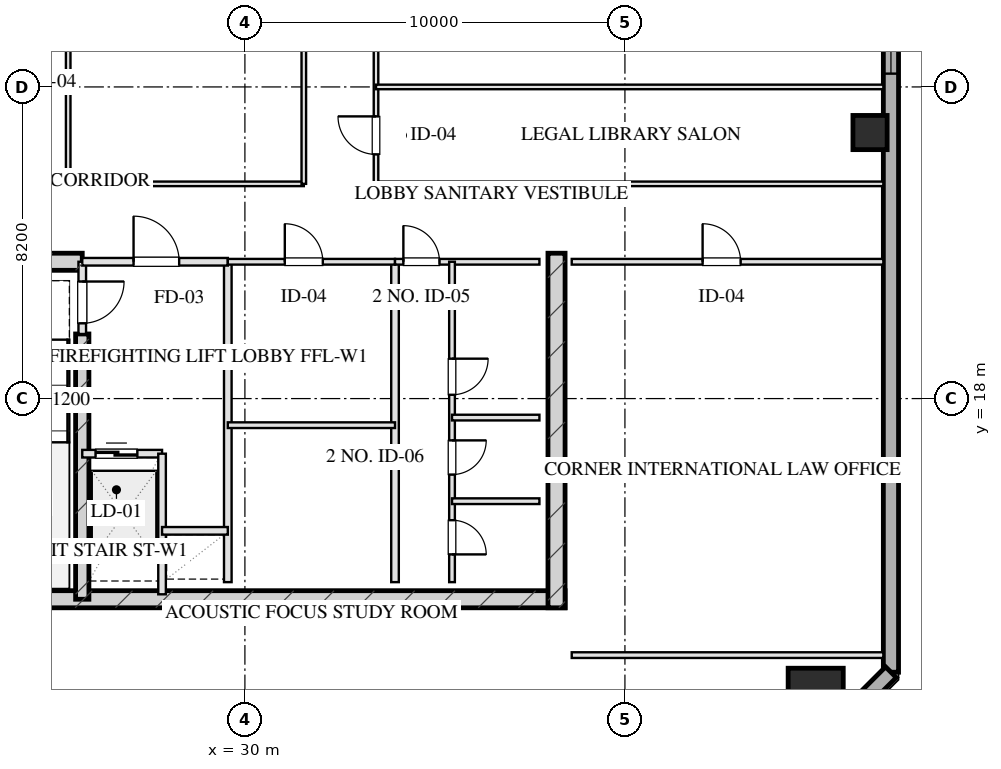
"""IFC4 building model, lengths in metres.
Left out: names, types, materials, properties, quantities, classifications, styles, units other than length and angle.
Written with IfcOpenShell. Run it as: python <this file> out.ifc"""

import sys

from ifc_helpers import new_model, si_unit, direction, frame, frame_2d, origin, origin_2d, place, context, subcontext, project, spatial, rectangle, hollow_rectangle, extrude, element, fill, save


model = new_model("IFC4")
c1 = context("Model", 3, precision=1e-05, world=origin(), true_north=direction((0.0, 1.0)))
c2 = subcontext(c1, "Body", "Model", "MODEL_VIEW")
j1 = project(units=[si_unit("LENGTHUNIT", "METRE"), si_unit("PLANEANGLEUNIT", "RADIAN")], contexts=[c1])
p1 = place(None, origin())
s1 = spatial("IfcSite", under=j1, at=p1, CompositionType="ELEMENT")
p2 = place(p1, origin())
s2 = spatial("IfcBuilding", under=s1, at=p2, CompositionType="ELEMENT")
p3 = place(p2, frame((0.0, 0.0, 192.05)))
s3 = spatial("IfcBuildingStorey", under=s2, at=p3, CompositionType="ELEMENT", Elevation=192.05)
p4 = place(p3, frame((21.575, 12.72, 0.0), z_axis=(0.0, 0.0, 1.0), x_axis=(1.0, 0.0, 0.0)))
e1 = element("IfcWall", 1, at=p4, inside=s3, PredefinedType="SHEAR", context=c2, shape_type="SweptSolid", body=[
    extrude(rectangle(XDim=16.85, YDim=0.45, at=frame_2d((8.425, 0.0))), origin(), (0.0, 0.0, 1.0), 3.45),
])
p5 = place(p3, frame((38.2, 21.825, 0.0), z_axis=(0.0, 0.0, 1.0), x_axis=(0.0, -1.0, 0.0)))
e2 = element("IfcWall", 2, at=p5, inside=s3, PredefinedType="SHEAR", context=c2, shape_type="SweptSolid", body=[
    extrude(rectangle(XDim=9.33, YDim=0.45, at=frame_2d((4.665, 0.0))), origin(), (0.0, 0.0, 1.0), 3.45),
])
p6 = place(p3, frame((25.72, 19.7, 0.0), z_axis=(0.0, 0.0, 1.0), x_axis=(0.0, -1.0, 0.0)))
e3 = element("IfcWall", 3, at=p6, inside=s3, PredefinedType="SHEAR", context=c2, shape_type="SweptSolid", body=[
    extrude(rectangle(XDim=6.98, YDim=0.35, at=frame_2d((3.49, 0.0))), origin(), (0.0, 0.0, 1.0), 3.45),
])
p7 = place(p3, frame((21.575, 21.6, 0.0), z_axis=(0.0, 0.0, 1.0), x_axis=(1.0, 0.0, 0.0)))
e4 = element("IfcWall", 4, at=p7, inside=s3, PredefinedType="SHEAR", context=c2, shape_type="SweptSolid", body=[
    extrude(rectangle(XDim=4.145, YDim=0.45, at=frame_2d((2.073, 0.0))), origin(), (0.0, 0.0, 1.0), 3.45),
])
p8 = place(p3, frame((45.02, 10.18, 0.0), z_axis=(0.0, 0.0, 1.0), x_axis=(1.0, 0.0, 0.0)))
e5 = element("IfcColumn", 5, at=p8, inside=s3, PredefinedType="COLUMN", context=c2, shape_type="SweptSolid", body=[
    extrude(hollow_rectangle(XDim=1.45, YDim=1.45, WallThickness=0.05, at=origin_2d()), origin(), (0.0, 0.0, 1.0), 3.451),
])
p9 = place(p3, frame((46.45, 25.0, 0.0), z_axis=(0.0, 0.0, 1.0), x_axis=(1.0, 0.0, 0.0)))
e6 = element("IfcColumn", 6, at=p9, inside=s3, PredefinedType="COLUMN", context=c2, shape_type="SweptSolid", body=[
    extrude(hollow_rectangle(XDim=0.9, YDim=0.9, WallThickness=0.032, at=origin_2d()), origin(), (0.0, 0.0, 1.0), 3.451),
])
p10 = place(p3, frame((47.0, 57.2, 0.0), z_axis=(0.0, 0.0, 1.0), x_axis=(0.0, -1.0, 0.0)))
e7 = element("IfcWall", 7, at=p10, inside=s3, PredefinedType="SOLIDWALL", context=c2, shape_type="SweptSolid", body=[
    extrude(rectangle(XDim=46.4, YDim=0.4, at=frame_2d((23.2, 0.0))), origin(), (0.0, 0.0, 1.0), 2.61),
])
p11 = place(p10, frame((28.55, 0.0, 0.75)))
e8 = element("IfcOpeningElement", 8, at=p11, cuts=e7, PredefinedType="OPENING", context=c2, shape_type="SweptSolid", body=[
    extrude(rectangle(XDim=2.1, YDim=1.46, at=frame_2d((1.05, 0.73))), frame((0.0, 0.21, 0.0), z_axis=(0.0, -1.0, 0.0), x_axis=(1.0, 0.0, 0.0)), (0.0, 0.0, 1.0), 0.42),
])
p12 = place(p10, frame((24.75, 0.0, 0.75)))
e9 = element("IfcOpeningElement", 9, at=p12, cuts=e7, PredefinedType="OPENING", context=c2, shape_type="SweptSolid", body=[
    extrude(rectangle(XDim=2.1, YDim=1.46, at=frame_2d((1.05, 0.73))), frame((0.0, 0.21, 0.0), z_axis=(0.0, -1.0, 0.0), x_axis=(1.0, 0.0, 0.0)), (0.0, 0.0, 1.0), 0.42),
])
p13 = place(p10, frame((19.55, 0.0, 0.75)))
e10 = element("IfcOpeningElement", 10, at=p13, cuts=e7, PredefinedType="OPENING", context=c2, shape_type="SweptSolid", body=[
    extrude(rectangle(XDim=2.1, YDim=1.46, at=frame_2d((1.05, 0.73))), frame((0.0, 0.21, 0.0), z_axis=(0.0, -1.0, 0.0), x_axis=(1.0, 0.0, 0.0)), (0.0, 0.0, 1.0), 0.42),
])
p14 = place(p10, frame((15.75, 0.0, 0.75)))
e11 = element("IfcOpeningElement", 11, at=p14, cuts=e7, PredefinedType="OPENING", context=c2, shape_type="SweptSolid", body=[
    extrude(rectangle(XDim=2.1, YDim=1.46, at=frame_2d((1.05, 0.73))), frame((0.0, 0.21, 0.0), z_axis=(0.0, -1.0, 0.0), x_axis=(1.0, 0.0, 0.0)), (0.0, 0.0, 1.0), 0.42),
])
p15 = place(p3, frame((47.0, 10.8, 0.0), z_axis=(0.0, 0.0, 1.0), x_axis=(-0.707106781187, -0.707106781187, 0.0)))
e12 = element("IfcWall", 12, at=p15, inside=s3, PredefinedType="SOLIDWALL", context=c2, shape_type="SweptSolid", body=[
    extrude(rectangle(XDim=3.677, YDim=0.4, at=frame_2d((1.838, 0.0))), origin(), (0.0, 0.0, 1.0), 2.61),
])
p16 = place(p3, frame((25.72, 21.6, 0.0), z_axis=(0.0, 0.0, 1.0), x_axis=(0.0, -1.0, 0.0)))
e13 = element("IfcWall", 13, at=p16, inside=s3, PredefinedType="PARTITIONING", context=c2, shape_type="SweptSolid", body=[
    extrude(rectangle(XDim=1.9, YDim=0.2, at=frame_2d((0.95, 0.0))), origin(), (0.0, 0.0, 1.0), 3.175),
])
p17 = place(p16, frame((0.52, 0.0, 0.0)))
e14 = element("IfcOpeningElement", 14, at=p17, cuts=e13, PredefinedType="OPENING", context=c2, shape_type="SweptSolid", body=[
    extrude(rectangle(XDim=1.1, YDim=2.05, at=frame_2d((0.55, 1.025))), frame((0.0, 0.11, 0.0), z_axis=(0.0, -1.0, 0.0), x_axis=(1.0, 0.0, 0.0)), (0.0, 0.0, 1.0), 0.22),
])
p18 = place(p3, frame((29.55, 21.6, 0.0), z_axis=(0.0, 0.0, 1.0), x_axis=(0.0, -1.0, 0.0)))
e15 = element("IfcWall", 15, at=p18, inside=s3, PredefinedType="PARTITIONING", context=c2, shape_type="SweptSolid", body=[
    extrude(rectangle(XDim=8.43, YDim=0.2, at=frame_2d((4.215, 0.0))), origin(), (0.0, 0.0, 1.0), 3.175),
])
p19 = place(p3, frame((25.72, 21.6, 0.0), z_axis=(0.0, 0.0, 1.0), x_axis=(1.0, 0.0, 0.0)))
e16 = element("IfcWall", 16, at=p19, inside=s3, PredefinedType="PARTITIONING", context=c2, shape_type="SweptSolid", body=[
    extrude(rectangle(XDim=3.83, YDim=0.2, at=frame_2d((1.915, 0.0))), origin(), (0.0, 0.0, 1.0), 3.175),
])
p20 = place(p19, frame((1.35, 0.0, 0.0)))
e17 = element("IfcOpeningElement", 17, at=p20, cuts=e16, PredefinedType="OPENING", context=c2, shape_type="SweptSolid", body=[
    extrude(rectangle(XDim=1.2, YDim=2.05, at=frame_2d((0.6, 1.025))), frame((0.0, 0.11, 0.0), z_axis=(0.0, -1.0, 0.0), x_axis=(1.0, 0.0, 0.0)), (0.0, 0.0, 1.0), 0.22),
])
p21 = place(p3, frame((25.72, 16.55, 0.0), z_axis=(0.0, 0.0, 1.0), x_axis=(1.0, 0.0, 0.0)))
e18 = element("IfcWall", 18, at=p21, inside=s3, PredefinedType="PARTITIONING", context=c2, shape_type="SweptSolid", body=[
    extrude(rectangle(XDim=2.1, YDim=0.2, at=frame_2d((1.05, 0.0))), origin(), (0.0, 0.0, 1.0), 3.175),
])
p22 = place(p21, frame((0.35, 0.0, 0.0)))
e19 = element("IfcOpeningElement", 19, at=p22, cuts=e18, PredefinedType="OPENING", context=c2, shape_type="SweptSolid", body=[
    extrude(rectangle(XDim=1.1, YDim=2.05, at=frame_2d((0.55, 1.025))), frame((0.0, 0.11, 0.0), z_axis=(0.0, -1.0, 0.0), x_axis=(1.0, 0.0, 0.0)), (0.0, 0.0, 1.0), 0.22),
])
p23 = place(p3, frame((27.82, 16.55, 0.0), z_axis=(0.0, 0.0, 1.0), x_axis=(0.0, -1.0, 0.0)))
e20 = element("IfcWall", 20, at=p23, inside=s3, PredefinedType="PARTITIONING", context=c2, shape_type="SweptSolid", body=[
    extrude(rectangle(XDim=3.7, YDim=0.2, at=frame_2d((1.85, 0.0))), origin(), (0.0, 0.0, 1.0), 3.175),
])
p24 = place(p3, frame((27.82, 14.52, 0.0), z_axis=(0.0, 0.0, 1.0), x_axis=(1.0, 0.0, 0.0)))
e21 = element("IfcWall", 21, at=p24, inside=s3, PredefinedType="PARTITIONING", context=c2, shape_type="SweptSolid", body=[
    extrude(rectangle(XDim=1.73, YDim=0.2, at=frame_2d((0.865, 0.0))), origin(), (0.0, 0.0, 1.0), 3.175),
])
p25 = place(p3, frame((33.95, 21.6, 0.0), z_axis=(0.0, 0.0, 1.0), x_axis=(0.0, -1.0, 0.0)))
e22 = element("IfcWall", 22, at=p25, inside=s3, PredefinedType="PARTITIONING", context=c2, shape_type="SweptSolid", body=[
    extrude(rectangle(XDim=8.43, YDim=0.2, at=frame_2d((4.215, 0.0))), origin(), (0.0, 0.0, 1.0), 3.175),
])
p26 = place(p3, frame((29.55, 21.6, 0.0), z_axis=(0.0, 0.0, 1.0), x_axis=(1.0, 0.0, 0.0)))
e23 = element("IfcWall", 23, at=p26, inside=s3, PredefinedType="PARTITIONING", context=c2, shape_type="SweptSolid", body=[
    extrude(rectangle(XDim=4.4, YDim=0.15, at=frame_2d((2.2, 0.0))), origin(), (0.0, 0.0, 1.0), 3.175),
])
p27 = place(p26, frame((1.5, 0.0, 0.0)))
e24 = element("IfcOpeningElement", 24, at=p27, cuts=e23, PredefinedType="OPENING", context=c2, shape_type="SweptSolid", body=[
    extrude(rectangle(XDim=1.0, YDim=2.05, at=frame_2d((0.5, 1.025))), frame((0.0, 0.085, 0.0), z_axis=(0.0, -1.0, 0.0), x_axis=(1.0, 0.0, 0.0)), (0.0, 0.0, 1.0), 0.17),
])
p28 = place(p3, frame((29.55, 17.3, 0.0), z_axis=(0.0, 0.0, 1.0), x_axis=(1.0, 0.0, 0.0)))
e25 = element("IfcWall", 25, at=p28, inside=s3, PredefinedType="PARTITIONING", context=c2, shape_type="SweptSolid", body=[
    extrude(rectangle(XDim=4.4, YDim=0.15, at=frame_2d((2.2, 0.0))), origin(), (0.0, 0.0, 1.0), 3.175),
])
p29 = place(p3, frame((33.95, 21.6, 0.0), z_axis=(0.0, 0.0, 1.0), x_axis=(1.0, 0.0, 0.0)))
e26 = element("IfcWall", 26, at=p29, inside=s3, PredefinedType="PARTITIONING", context=c2, shape_type="SweptSolid", body=[
    extrude(rectangle(XDim=3.8, YDim=0.15, at=frame_2d((1.9, 0.0))), origin(), (0.0, 0.0, 1.0), 3.175),
])
p30 = place(p29, frame((0.22, 0.0, 0.0)))
e27 = element("IfcOpeningElement", 27, at=p30, cuts=e26, PredefinedType="OPENING", context=c2, shape_type="SweptSolid", body=[
    extrude(rectangle(XDim=0.95, YDim=2.05, at=frame_2d((0.475, 1.025))), frame((0.0, 0.085, 0.0), z_axis=(0.0, -1.0, 0.0), x_axis=(1.0, 0.0, 0.0)), (0.0, 0.0, 1.0), 0.17),
])
p31 = place(p3, frame((35.45, 21.6, 0.0), z_axis=(0.0, 0.0, 1.0), x_axis=(0.0, -1.0, 0.0)))
e28 = element("IfcWall", 28, at=p31, inside=s3, PredefinedType="PARTITIONING", context=c2, shape_type="SweptSolid", body=[
    extrude(rectangle(XDim=8.43, YDim=0.15, at=frame_2d((4.215, 0.0))), origin(), (0.0, 0.0, 1.0), 2.815),
])
p32 = place(p31, frame((2.55, 0.0, 0.0)))
e29 = element("IfcOpeningElement", 29, at=p32, cuts=e28, PredefinedType="OPENING", context=c2, shape_type="SweptSolid", body=[
    extrude(rectangle(XDim=0.95, YDim=2.05, at=frame_2d((0.475, 1.025))), frame((0.0, 0.085, 0.0), z_axis=(0.0, -1.0, 0.0), x_axis=(1.0, 0.0, 0.0)), (0.0, 0.0, 1.0), 0.17),
])
p33 = place(p31, frame((4.7, 0.0, 0.0)))
e30 = element("IfcOpeningElement", 30, at=p33, cuts=e28, PredefinedType="OPENING", context=c2, shape_type="SweptSolid", body=[
    extrude(rectangle(XDim=0.9, YDim=2.05, at=frame_2d((0.45, 1.025))), frame((0.0, 0.085, 0.0), z_axis=(0.0, -1.0, 0.0), x_axis=(1.0, 0.0, 0.0)), (0.0, 0.0, 1.0), 0.17),
])
p34 = place(p31, frame((6.8, 0.0, 0.0)))
e31 = element("IfcOpeningElement", 31, at=p34, cuts=e28, PredefinedType="OPENING", context=c2, shape_type="SweptSolid", body=[
    extrude(rectangle(XDim=0.9, YDim=2.05, at=frame_2d((0.45, 1.025))), frame((0.0, 0.085, 0.0), z_axis=(0.0, -1.0, 0.0), x_axis=(1.0, 0.0, 0.0)), (0.0, 0.0, 1.0), 0.17),
])
for number, where, z_axis, x_axis in (
    (32, (35.45, 17.5, 0.0), (0.0, 0.0, 1.0), (1.0, 0.0, 0.0)),
    (33, (35.45, 15.3, 0.0), (0.0, 0.0, 1.0), (1.0, 0.0, 0.0)),
):
    element("IfcWall", number, at=place(p3, frame(where, z_axis=z_axis, x_axis=x_axis)), inside=s3, PredefinedType="PARTITIONING", context=c2, shape_type="SweptSolid", body=[
        extrude(rectangle(XDim=2.3, YDim=0.15, at=frame_2d((1.15, 0.0))), origin(), (0.0, 0.0, 1.0), 3.175),
    ])
p35 = place(p3, frame((38.6, 11.25, 0.0), z_axis=(0.0, 0.0, 1.0), x_axis=(1.0, 0.0, 0.0)))
e34 = element("IfcWall", 34, at=p35, inside=s3, PredefinedType="PARTITIONING", context=c2, shape_type="SweptSolid", body=[
    extrude(rectangle(XDim=8.2, YDim=0.15, at=frame_2d((4.1, 0.0))), origin(), (0.0, 0.0, 1.0), 3.175),
])
p36 = place(p3, frame((38.6, 21.6, 0.0), z_axis=(0.0, 0.0, 1.0), x_axis=(1.0, 0.0, 0.0)))
e35 = element("IfcWall", 35, at=p36, inside=s3, PredefinedType="PARTITIONING", context=c2, shape_type="SweptSolid", body=[
    extrude(rectangle(XDim=8.2, YDim=0.15, at=frame_2d((4.1, 0.0))), origin(), (0.0, 0.0, 1.0), 3.175),
])
p37 = place(p36, frame((3.444, 0.0, 0.0)))
e36 = element("IfcOpeningElement", 36, at=p37, cuts=e35, PredefinedType="OPENING", context=c2, shape_type="SweptSolid", body=[
    extrude(rectangle(XDim=1.0, YDim=2.05, at=frame_2d((0.5, 1.025))), frame((0.0, 0.085, 0.0), z_axis=(0.0, -1.0, 0.0), x_axis=(1.0, 0.0, 0.0)), (0.0, 0.0, 1.0), 0.17),
])
p38 = place(p3, frame((25.35, 23.65, 0.0), z_axis=(0.0, 0.0, 1.0), x_axis=(1.0, 0.0, 0.0)))
e37 = element("IfcWall", 37, at=p38, inside=s3, PredefinedType="PARTITIONING", context=c2, shape_type="SweptSolid", body=[
    extrude(rectangle(XDim=6.2, YDim=0.12, at=frame_2d((3.1, 0.0))), origin(), (0.0, 0.0, 1.0), 3.175),
])
p39 = place(p3, frame((33.45, 23.65, 0.0), z_axis=(0.0, 0.0, 1.0), x_axis=(1.0, 0.0, 0.0)))
e38 = element("IfcWall", 38, at=p39, inside=s3, PredefinedType="PARTITIONING", context=c2, shape_type="SweptSolid", body=[
    extrude(rectangle(XDim=13.35, YDim=0.12, at=frame_2d((6.675, 0.0))), origin(), (0.0, 0.0, 1.0), 3.175),
])
p40 = place(p3, frame((25.35, 23.65, 0.0), z_axis=(0.0, 0.0, 1.0), x_axis=(0.0, 1.0, 0.0)))
e39 = element("IfcWall", 39, at=p40, inside=s3, PredefinedType="PARTITIONING", context=c2, shape_type="SweptSolid", body=[
    extrude(rectangle(XDim=20.7, YDim=0.12, at=frame_2d((10.35, 0.0))), origin(), (0.0, 0.0, 1.0), 3.175),
])
p41 = place(p40, frame((4.963, 0.0, 0.0)))
e40 = element("IfcOpeningElement", 40, at=p41, cuts=e39, PredefinedType="OPENING", context=c2, shape_type="SweptSolid", body=[
    extrude(rectangle(XDim=1.1, YDim=2.05, at=frame_2d((0.55, 1.025))), frame((0.0, 0.07, 0.0), z_axis=(0.0, -1.0, 0.0), x_axis=(1.0, 0.0, 0.0)), (0.0, 0.0, 1.0), 0.14),
])
p42 = place(p40, frame((15.382, 0.0, 0.0)))
e41 = element("IfcOpeningElement", 41, at=p42, cuts=e39, PredefinedType="OPENING", context=c2, shape_type="SweptSolid", body=[
    extrude(rectangle(XDim=1.1, YDim=2.05, at=frame_2d((0.55, 1.025))), frame((0.0, 0.07, 0.0), z_axis=(0.0, -1.0, 0.0), x_axis=(1.0, 0.0, 0.0)), (0.0, 0.0, 1.0), 0.14),
])
p43 = place(p3, frame((31.55, 23.65, 0.0), z_axis=(0.0, 0.0, 1.0), x_axis=(0.0, 1.0, 0.0)))
e42 = element("IfcWall", 42, at=p43, inside=s3, PredefinedType="PARTITIONING", context=c2, shape_type="SweptSolid", body=[
    extrude(rectangle(XDim=20.7, YDim=0.12, at=frame_2d((10.35, 0.0))), origin(), (0.0, 0.0, 1.0), 3.175),
])
p44 = place(p3, frame((33.45, 23.65, 0.0), z_axis=(0.0, 0.0, 1.0), x_axis=(0.0, 1.0, 0.0)))
e43 = element("IfcWall", 43, at=p44, inside=s3, PredefinedType="PARTITIONING", context=c2, shape_type="SweptSolid", body=[
    extrude(rectangle(XDim=20.7, YDim=0.12, at=frame_2d((10.35, 0.0))), origin(), (0.0, 0.0, 1.0), 3.175),
])
p45 = place(p44, frame((0.775, 0.0, 0.0)))
e44 = element("IfcOpeningElement", 44, at=p45, cuts=e43, PredefinedType="OPENING", context=c2, shape_type="SweptSolid", body=[
    extrude(rectangle(XDim=1.0, YDim=2.05, at=frame_2d((0.5, 1.025))), frame((0.0, 0.07, 0.0), z_axis=(0.0, -1.0, 0.0), x_axis=(1.0, 0.0, 0.0)), (0.0, 0.0, 1.0), 0.14),
])
p46 = place(p44, frame((5.35, 0.0, 0.0)))
e45 = element("IfcOpeningElement", 45, at=p46, cuts=e43, PredefinedType="OPENING", context=c2, shape_type="SweptSolid", body=[
    extrude(rectangle(XDim=1.0, YDim=2.05, at=frame_2d((0.5, 1.025))), frame((0.0, 0.07, 0.0), z_axis=(0.0, -1.0, 0.0), x_axis=(1.0, 0.0, 0.0)), (0.0, 0.0, 1.0), 0.14),
])
p47 = place(p44, frame((9.85, 0.0, 0.0)))
e46 = element("IfcOpeningElement", 46, at=p47, cuts=e43, PredefinedType="OPENING", context=c2, shape_type="SweptSolid", body=[
    extrude(rectangle(XDim=1.0, YDim=2.05, at=frame_2d((0.5, 1.025))), frame((0.0, 0.07, 0.0), z_axis=(0.0, -1.0, 0.0), x_axis=(1.0, 0.0, 0.0)), (0.0, 0.0, 1.0), 0.14),
])
p48 = place(p44, frame((12.95, 0.0, 0.0)))
e47 = element("IfcOpeningElement", 47, at=p48, cuts=e43, PredefinedType="OPENING", context=c2, shape_type="SweptSolid", body=[
    extrude(rectangle(XDim=1.0, YDim=2.05, at=frame_2d((0.5, 1.025))), frame((0.0, 0.07, 0.0), z_axis=(0.0, -1.0, 0.0), x_axis=(1.0, 0.0, 0.0)), (0.0, 0.0, 1.0), 0.14),
])
p49 = place(p44, frame((17.525, 0.0, 0.0)))
e48 = element("IfcOpeningElement", 48, at=p49, cuts=e43, PredefinedType="OPENING", context=c2, shape_type="SweptSolid", body=[
    extrude(rectangle(XDim=1.0, YDim=2.05, at=frame_2d((0.5, 1.025))), frame((0.0, 0.07, 0.0), z_axis=(0.0, -1.0, 0.0), x_axis=(1.0, 0.0, 0.0)), (0.0, 0.0, 1.0), 0.14),
])
p50 = place(p3, frame((33.45, 26.2, 0.0), z_axis=(0.0, 0.0, 1.0), x_axis=(1.0, 0.0, 0.0)))
e49 = element("IfcWall", 49, at=p50, inside=s3, PredefinedType="PARTITIONING", context=c2, shape_type="SweptSolid", body=[
    extrude(rectangle(XDim=13.35, YDim=0.12, at=frame_2d((6.675, 0.0))), origin(), (0.0, 0.0, 1.0), 3.175),
])
p51 = place(p11, origin())
e50 = element("IfcWindow", 50, at=p51, inside=s3, PartitioningType="TRIPLE_PANEL_VERTICAL", PredefinedType="WINDOW", context=c2, shape_type="SweptSolid", body=[
    extrude(rectangle(XDim=2.1, YDim=1.46, at=frame_2d((1.05, 0.73))), frame((0.0, 0.03, 0.0), z_axis=(0.0, -1.0, 0.0), x_axis=(1.0, 0.0, 0.0)), (0.0, 0.0, 1.0), 0.06),
])
fill(e8, e50)
p52 = place(p17, origin())
e51 = element("IfcDoor", 51, at=p52, inside=s3, OperationType="SINGLE_SWING_LEFT", PredefinedType="DOOR", context=c2, shape_type="SweptSolid", body=[
    extrude(rectangle(XDim=1.1, YDim=2.05, at=frame_2d((0.55, 1.025))), frame((0.0, 0.025, 0.0), z_axis=(0.0, -1.0, 0.0), x_axis=(1.0, 0.0, 0.0)), (0.0, 0.0, 1.0), 0.05),
])
fill(e14, e51)
p53 = place(p20, origin())
e52 = element("IfcDoor", 52, at=p53, inside=s3, OperationType="SINGLE_SWING_LEFT", PredefinedType="DOOR", context=c2, shape_type="SweptSolid", body=[
    extrude(rectangle(XDim=1.2, YDim=2.05, at=frame_2d((0.6, 1.025))), frame((0.0, 0.025, 0.0), z_axis=(0.0, -1.0, 0.0), x_axis=(1.0, 0.0, 0.0)), (0.0, 0.0, 1.0), 0.05),
])
fill(e17, e52)
p54 = place(p22, origin())
e53 = element("IfcDoor", 53, at=p54, inside=s3, OperationType="DOUBLE_DOOR_SLIDING", PredefinedType="DOOR", context=c2, shape_type="SweptSolid", body=[
    extrude(rectangle(XDim=1.1, YDim=2.05, at=frame_2d((0.55, 1.025))), frame((0.0, 0.025, 0.0), z_axis=(0.0, -1.0, 0.0), x_axis=(1.0, 0.0, 0.0)), (0.0, 0.0, 1.0), 0.05),
])
fill(e19, e53)
p55 = place(p27, origin())
e54 = element("IfcDoor", 54, at=p55, inside=s3, OperationType="SINGLE_SWING_LEFT", PredefinedType="DOOR", context=c2, shape_type="SweptSolid", body=[
    extrude(rectangle(XDim=1.0, YDim=2.05, at=frame_2d((0.5, 1.025))), frame((0.0, 0.025, 0.0), z_axis=(0.0, -1.0, 0.0), x_axis=(1.0, 0.0, 0.0)), (0.0, 0.0, 1.0), 0.05),
])
fill(e24, e54)
p56 = place(p30, origin())
e55 = element("IfcDoor", 55, at=p56, inside=s3, OperationType="SINGLE_SWING_LEFT", PredefinedType="DOOR", context=c2, shape_type="SweptSolid", body=[
    extrude(rectangle(XDim=0.95, YDim=2.05, at=frame_2d((0.475, 1.025))), frame((0.0, 0.025, 0.0), z_axis=(0.0, -1.0, 0.0), x_axis=(1.0, 0.0, 0.0)), (0.0, 0.0, 1.0), 0.05),
])
fill(e27, e55)
p57 = place(p32, origin())
e56 = element("IfcDoor", 56, at=p57, inside=s3, OperationType="SINGLE_SWING_LEFT", PredefinedType="DOOR", context=c2, shape_type="SweptSolid", body=[
    extrude(rectangle(XDim=0.95, YDim=2.05, at=frame_2d((0.475, 1.025))), frame((0.0, 0.025, 0.0), z_axis=(0.0, -1.0, 0.0), x_axis=(1.0, 0.0, 0.0)), (0.0, 0.0, 1.0), 0.05),
])
fill(e29, e56)
p58 = place(p33, origin())
e57 = element("IfcDoor", 57, at=p58, inside=s3, OperationType="SINGLE_SWING_LEFT", PredefinedType="DOOR", context=c2, shape_type="SweptSolid", body=[
    extrude(rectangle(XDim=0.9, YDim=2.05, at=frame_2d((0.45, 1.025))), frame((0.0, 0.025, 0.0), z_axis=(0.0, -1.0, 0.0), x_axis=(1.0, 0.0, 0.0)), (0.0, 0.0, 1.0), 0.05),
])
fill(e30, e57)
p59 = place(p34, origin())
e58 = element("IfcDoor", 58, at=p59, inside=s3, OperationType="SINGLE_SWING_RIGHT", PredefinedType="DOOR", context=c2, shape_type="SweptSolid", body=[
    extrude(rectangle(XDim=0.9, YDim=2.05, at=frame_2d((0.45, 1.025))), frame((0.0, 0.025, 0.0), z_axis=(0.0, -1.0, 0.0), x_axis=(1.0, 0.0, 0.0)), (0.0, 0.0, 1.0), 0.05),
])
fill(e31, e58)
p60 = place(p37, origin())
e59 = element("IfcDoor", 59, at=p60, inside=s3, OperationType="SINGLE_SWING_LEFT", PredefinedType="DOOR", context=c2, shape_type="SweptSolid", body=[
    extrude(rectangle(XDim=1.0, YDim=2.05, at=frame_2d((0.5, 1.025))), frame((0.0, 0.025, 0.0), z_axis=(0.0, -1.0, 0.0), x_axis=(1.0, 0.0, 0.0)), (0.0, 0.0, 1.0), 0.05),
])
fill(e36, e59)
p61 = place(p45, origin())
e60 = element("IfcDoor", 60, at=p61, inside=s3, OperationType="SINGLE_SWING_RIGHT", PredefinedType="DOOR", context=c2, shape_type="SweptSolid", body=[
    extrude(rectangle(XDim=1.0, YDim=2.05, at=frame_2d((0.5, 1.025))), frame((0.0, 0.025, 0.0), z_axis=(0.0, -1.0, 0.0), x_axis=(1.0, 0.0, 0.0)), (0.0, 0.0, 1.0), 0.05),
])
fill(e44, e60)
save(model, sys.argv[1])
